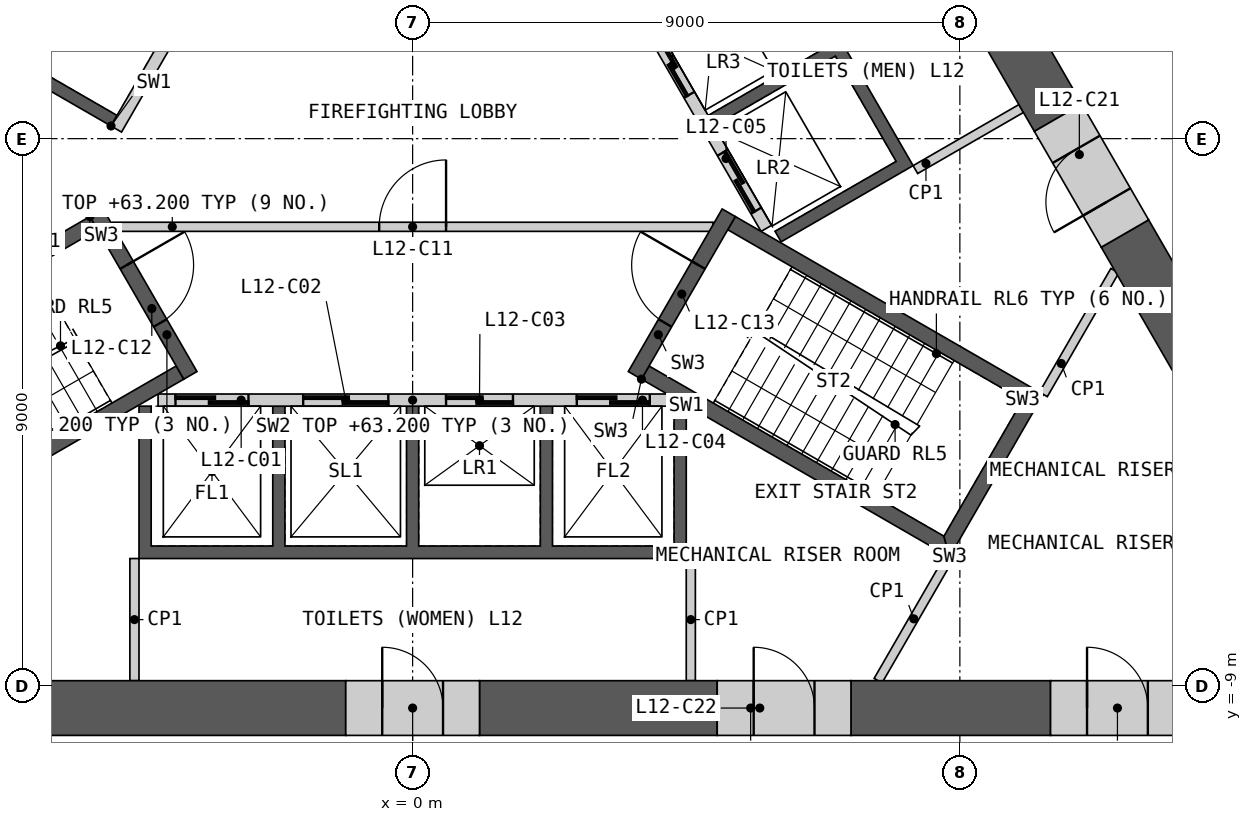
"""IFC4 building model, lengths in metres.
Left out: names, types, materials, properties, quantities, classifications, styles, units other than length and angle.
Written with IfcOpenShell. Run it as: python <this file> out.ifc"""

import sys

from ifc_helpers import new_model, si_unit, direction, frame, frame_2d, origin, place, context, subcontext, project, spatial, polyline, rectangle, outline, extrude, element, fill, save


model = new_model("IFC4")
c1 = context("Model", 3, precision=1e-05, world=origin(), true_north=direction((0.0, 1.0)))
c2 = subcontext(c1, "Body", "Model", "MODEL_VIEW")
j1 = project(units=[si_unit("LENGTHUNIT", "METRE"), si_unit("PLANEANGLEUNIT", "RADIAN")], contexts=[c1])
p1 = place(None, origin())
s1 = spatial("IfcSite", under=j1, at=p1, CompositionType="ELEMENT")
p2 = place(p1, origin())
s2 = spatial("IfcBuilding", under=s1, at=p2, CompositionType="ELEMENT")
p3 = place(p2, frame((0.0, 0.0, 59.4)))
s3 = spatial("IfcBuildingStorey", under=s2, at=p3, CompositionType="ELEMENT", Elevation=59.4)
p4 = place(p3, origin())
e1 = element("IfcWall", 1, at=p4, inside=s3, PredefinedType="SHEAR", context=c2, shape_type="SweptSolid", body=[
    extrude(outline(polyline([(4.5, -4.4), (4.5, -6.906), (-4.5, -6.906), (-4.5, -4.4), (-4.3, -4.4), (-4.3, -6.7), (-2.3, -6.7), (-2.3, -4.4), (-2.1, -4.4), (-2.1, -6.7), (-0.1, -6.7), (-0.1, -4.4), (0.1, -4.4), (0.1, -6.7), (2.1, -6.7), (2.1, -4.4), (2.3, -4.4), (2.3, -6.7), (4.3, -6.7), (4.3, -4.4), (4.5, -4.4)])), origin(), (0.0, 0.0, 1.0), 3.8),
])
p5 = place(p3, frame((-4.187, -4.3, 0.0), z_axis=(0.0, 0.0, 1.0), x_axis=(1.0, 0.0, 0.0)))
e2 = element("IfcWall", 2, at=p5, inside=s3, PredefinedType="SOLIDWALL", context=c2, shape_type="SweptSolid", body=[
    extrude(rectangle(XDim=8.373, YDim=0.2, at=frame_2d((4.187, 0.0))), origin(), (0.0, 0.0, 1.0), 3.8),
])
p6 = place(p5, frame((0.287, 0.0, 0.0)))
e3 = element("IfcOpeningElement", 3, at=p6, cuts=e2, PredefinedType="OPENING", context=c2, shape_type="SweptSolid", body=[
    extrude(rectangle(XDim=1.2, YDim=2.1, at=frame_2d((0.6, 1.05))), frame((0.0, 0.11, 0.0), z_axis=(0.0, -1.0, 0.0), x_axis=(1.0, 0.0, 0.0)), (0.0, 0.0, 1.0), 0.22),
])
p7 = place(p5, frame((2.387, 0.0, 0.0)))
e4 = element("IfcOpeningElement", 4, at=p7, cuts=e2, PredefinedType="OPENING", context=c2, shape_type="SweptSolid", body=[
    extrude(rectangle(XDim=1.4, YDim=2.1, at=frame_2d((0.7, 1.05))), frame((0.0, 0.11, 0.0), z_axis=(0.0, -1.0, 0.0), x_axis=(1.0, 0.0, 0.0)), (0.0, 0.0, 1.0), 0.22),
])
p8 = place(p5, frame((4.737, 0.0, 0.0)))
e5 = element("IfcOpeningElement", 5, at=p8, cuts=e2, PredefinedType="OPENING", context=c2, shape_type="SweptSolid", body=[
    extrude(rectangle(XDim=1.1, YDim=2.1, at=frame_2d((0.55, 1.05))), frame((0.0, 0.11, 0.0), z_axis=(0.0, -1.0, 0.0), x_axis=(1.0, 0.0, 0.0)), (0.0, 0.0, 1.0), 0.22),
])
p9 = place(p5, frame((6.887, 0.0, 0.0)))
e6 = element("IfcOpeningElement", 6, at=p9, cuts=e2, PredefinedType="OPENING", context=c2, shape_type="SweptSolid", body=[
    extrude(rectangle(XDim=1.2, YDim=2.1, at=frame_2d((0.6, 1.05))), frame((0.0, 0.11, 0.0), z_axis=(0.0, -1.0, 0.0), x_axis=(1.0, 0.0, 0.0)), (0.0, 0.0, 1.0), 0.22),
])
p10 = place(p3, origin())
e7 = element("IfcWall", 7, at=p10, inside=s3, PredefinedType="SHEAR", context=c2, shape_type="SweptSolid", body=[
    extrude(outline(polyline([(2.66, 4.192), (4.831, 5.445), (8.231, -0.444), (6.061, -1.697), (5.96, -1.524), (7.952, -0.374), (6.952, 1.358), (4.96, 0.208), (4.861, 0.381), (6.852, 1.531), (5.852, 3.263), (3.861, 2.113), (3.76, 2.287), (5.752, 3.437), (4.752, 5.169), (2.76, 4.019), (2.66, 4.192)])), origin(), (0.0, 0.0, 1.0), 3.8),
])
p11 = place(p3, frame((5.817, -1.476, 0.0), z_axis=(0.0, 0.0, 1.0), x_axis=(-0.500002616675, 0.866023893041, 0.0)))
e8 = element("IfcWall", 8, at=p11, inside=s3, PredefinedType="SOLIDWALL", context=c2, shape_type="SweptSolid", body=[
    extrude(rectangle(XDim=8.373, YDim=0.2, at=frame_2d((4.187, 0.0))), origin(), (0.0, 0.0, 1.0), 3.8),
])
p12 = place(p11, frame((0.337, 0.0, 0.0)))
e9 = element("IfcOpeningElement", 9, at=p12, cuts=e8, PredefinedType="OPENING", context=c2, shape_type="SweptSolid", body=[
    extrude(rectangle(XDim=1.1, YDim=2.1, at=frame_2d((0.55, 1.05))), frame((0.0, 0.11, 0.0), z_axis=(0.0, -1.0, 0.0), x_axis=(1.0, 0.0, 0.0)), (0.0, 0.0, 1.0), 0.22),
])
p13 = place(p11, frame((2.537, 0.0, 0.0)))
e10 = element("IfcOpeningElement", 10, at=p13, cuts=e8, PredefinedType="OPENING", context=c2, shape_type="SweptSolid", body=[
    extrude(rectangle(XDim=1.1, YDim=2.1, at=frame_2d((0.55, 1.05))), frame((0.0, 0.11, 0.0), z_axis=(0.0, -1.0, 0.0), x_axis=(1.0, 0.0, 0.0)), (0.0, 0.0, 1.0), 0.22),
])
p14 = place(p11, frame((4.737, 0.0, 0.0)))
e11 = element("IfcOpeningElement", 11, at=p14, cuts=e8, PredefinedType="OPENING", context=c2, shape_type="SweptSolid", body=[
    extrude(rectangle(XDim=1.1, YDim=2.1, at=frame_2d((0.55, 1.05))), frame((0.0, 0.11, 0.0), z_axis=(0.0, -1.0, 0.0), x_axis=(1.0, 0.0, 0.0)), (0.0, 0.0, 1.0), 0.22),
])
p15 = place(p11, frame((7.037, 0.0, 0.0)))
e12 = element("IfcOpeningElement", 12, at=p15, cuts=e8, PredefinedType="OPENING", context=c2, shape_type="SweptSolid", body=[
    extrude(rectangle(XDim=0.9, YDim=2.1, at=frame_2d((0.45, 1.05))), frame((0.0, 0.11, 0.0), z_axis=(0.0, -1.0, 0.0), x_axis=(1.0, 0.0, 0.0)), (0.0, 0.0, 1.0), 0.22),
])
p16 = place(p3, origin())
e13 = element("IfcWall", 13, at=p16, inside=s3, PredefinedType="SHEAR", context=c2, shape_type="SweptSolid", body=[
    extrude(outline(polyline([(-4.96, 0.208), (-7.131, 1.461), (-5.931, 3.54), (-3.76, 2.287), (-3.861, 2.113), (-5.852, 3.263), (-6.852, 1.531), (-4.861, 0.381), (-4.96, 0.208)])), origin(), (0.0, 0.0, 1.0), 3.8),
])
p17 = place(p3, frame((-1.631, 5.776, 0.0), z_axis=(0.0, 0.0, 1.0), x_axis=(-0.499992876559, -0.866029516466, 0.0)))
e14 = element("IfcWall", 14, at=p17, inside=s3, PredefinedType="SOLIDWALL", context=c2, shape_type="SweptSolid", body=[
    extrude(rectangle(XDim=6.486, YDim=0.2, at=frame_2d((3.243, 0.0))), origin(), (0.0, 0.0, 1.0), 3.8),
])
p18 = place(p17, frame((0.437, 0.0, 0.0)))
e15 = element("IfcOpeningElement", 15, at=p18, cuts=e14, PredefinedType="OPENING", context=c2, shape_type="SweptSolid", body=[
    extrude(rectangle(XDim=0.9, YDim=2.1, at=frame_2d((0.45, 1.05))), frame((0.0, 0.11, 0.0), z_axis=(0.0, -1.0, 0.0), x_axis=(1.0, 0.0, 0.0)), (0.0, 0.0, 1.0), 0.22),
])
p19 = place(p17, frame((2.637, 0.0, 0.0)))
e16 = element("IfcOpeningElement", 16, at=p19, cuts=e14, PredefinedType="OPENING", context=c2, shape_type="SweptSolid", body=[
    extrude(rectangle(XDim=0.9, YDim=2.1, at=frame_2d((0.45, 1.05))), frame((0.0, 0.11, 0.0), z_axis=(0.0, -1.0, 0.0), x_axis=(1.0, 0.0, 0.0)), (0.0, 0.0, 1.0), 0.22),
])
p20 = place(p3, frame((-4.941, -1.45, 0.0), z_axis=(0.0, 0.0, 1.0), x_axis=(1.0, 0.0, 0.0)))
e17 = element("IfcWall", 17, at=p20, inside=s3, PredefinedType="PARTITIONING", context=c2, shape_type="SweptSolid", body=[
    extrude(rectangle(XDim=9.882, YDim=0.15, at=frame_2d((4.941, 0.0))), origin(), (0.0, 0.0, 1.0), 3.8),
])
p21 = place(p20, frame((4.391, 0.0, 0.0)))
e18 = element("IfcOpeningElement", 18, at=p21, cuts=e17, PredefinedType="OPENING", context=c2, shape_type="SweptSolid", body=[
    extrude(rectangle(XDim=1.1, YDim=2.1, at=frame_2d((0.55, 1.05))), frame((0.0, 0.085, 0.0), z_axis=(0.0, -1.0, 0.0), x_axis=(1.0, 0.0, 0.0)), (0.0, 0.0, 1.0), 0.17),
])
p22 = place(p3, origin())
e19 = element("IfcWall", 19, at=p22, inside=s3, PredefinedType="SHEAR", context=c2, shape_type="SweptSolid", body=[
    extrude(outline(polyline([(-5.307, -1.281), (-10.374, -4.206), (-10.032, -4.298), (-5.182, -1.498), (-5.307, -1.281)])), origin(), (0.0, 0.0, 1.0), 3.8),
])
p23 = place(p3, origin())
e20 = element("IfcWall", 20, at=p23, inside=s3, PredefinedType="SHEAR", context=c2, shape_type="SweptSolid", body=[
    extrude(outline(polyline([(-8.738, -6.539), (-8.83, -6.881), (-3.763, -3.956), (-3.888, -3.739), (-8.738, -6.539)])), origin(), (0.0, 0.0, 1.0), 3.8),
])
p24 = place(p3, frame((-5.199, -1.219, 0.0), z_axis=(0.0, 0.0, 1.0), x_axis=(0.499982516597, -0.866035497597, 0.0)))
e21 = element("IfcWall", 21, at=p24, inside=s3, PredefinedType="SHEAR", context=c2, shape_type="SweptSolid", body=[
    extrude(rectangle(XDim=3.088, YDim=0.25, at=frame_2d((1.544, 0.0))), origin(), (0.0, 0.0, 1.0), 3.8),
])
p25 = place(p24, frame((0.994, 0.0, 0.0)))
e22 = element("IfcOpeningElement", 22, at=p25, cuts=e21, PredefinedType="OPENING", context=c2, shape_type="SweptSolid", body=[
    extrude(rectangle(XDim=1.1, YDim=2.1, at=frame_2d((0.55, 1.05))), frame((0.0, 0.135, 0.0), z_axis=(0.0, -1.0, 0.0), x_axis=(1.0, 0.0, 0.0)), (0.0, 0.0, 1.0), 0.27),
])
p26 = place(p3, origin())
e23 = element("IfcWall", 23, at=p26, inside=s3, PredefinedType="SHEAR", context=c2, shape_type="SweptSolid", body=[
    extrude(outline(polyline([(3.763, -3.956), (8.83, -6.881), (8.738, -6.539), (3.888, -3.739), (3.763, -3.956)])), origin(), (0.0, 0.0, 1.0), 3.8),
])
p27 = place(p3, origin())
e24 = element("IfcWall", 24, at=p27, inside=s3, PredefinedType="SHEAR", context=c2, shape_type="SweptSolid", body=[
    extrude(outline(polyline([(8.83, -6.881), (10.374, -4.206), (10.032, -4.298), (8.738, -6.539), (8.83, -6.881)])), origin(), (0.0, 0.0, 1.0), 3.8),
])
p28 = place(p3, origin())
e25 = element("IfcWall", 25, at=p28, inside=s3, PredefinedType="SHEAR", context=c2, shape_type="SweptSolid", body=[
    extrude(outline(polyline([(10.032, -4.298), (10.374, -4.206), (5.307, -1.281), (5.182, -1.498), (10.032, -4.298)])), origin(), (0.0, 0.0, 1.0), 3.8),
])
p29 = place(p3, frame((3.655, -3.893, 0.0), z_axis=(0.0, 0.0, 1.0), x_axis=(0.499982516597, 0.866035497597, 0.0)))
e26 = element("IfcWall", 26, at=p29, inside=s3, PredefinedType="SHEAR", context=c2, shape_type="SweptSolid", body=[
    extrude(rectangle(XDim=3.088, YDim=0.25, at=frame_2d((1.544, 0.0))), origin(), (0.0, 0.0, 1.0), 3.8),
])
p30 = place(p29, frame((0.994, 0.0, 0.0)))
e27 = element("IfcOpeningElement", 27, at=p30, cuts=e26, PredefinedType="OPENING", context=c2, shape_type="SweptSolid", body=[
    extrude(rectangle(XDim=1.1, YDim=2.1, at=frame_2d((0.55, 1.05))), frame((0.0, 0.135, 0.0), z_axis=(0.0, -1.0, 0.0), x_axis=(1.0, 0.0, 0.0)), (0.0, 0.0, 1.0), 0.27),
])
for number, where, z_axis, x_axis in (
    (28, (4.575, -6.906, 0.0), (0.0, 0.0, 1.0), (0.0, -1.0, 0.0)),
    (29, (-4.575, -6.906, 0.0), (0.0, 0.0, 1.0), (0.0, -1.0, 0.0)),
):
    element("IfcWall", number, at=place(p3, frame(where, z_axis=z_axis, x_axis=x_axis)), inside=s3, PredefinedType="PARTITIONING", context=c2, shape_type="SweptSolid", body=[
        extrude(rectangle(XDim=2.009, YDim=0.15, at=frame_2d((1.004, 0.0))), origin(), (0.0, 0.0, 1.0), 3.8),
    ])
p31 = place(p3, frame((8.268, -0.509, 0.0), z_axis=(0.0, 0.0, 1.0), x_axis=(0.866035824272, 0.499981950752, 0.0)))
e30 = element("IfcWall", 30, at=p31, inside=s3, PredefinedType="PARTITIONING", context=c2, shape_type="SweptSolid", body=[
    extrude(rectangle(XDim=2.009, YDim=0.15, at=frame_2d((1.004, 0.0))), origin(), (0.0, 0.0, 1.0), 3.8),
])
p32 = place(p3, frame((8.83, -6.881, 0.0), z_axis=(0.0, 0.0, 1.0), x_axis=(-0.500073279432, -0.865983091751, 0.0)))
e31 = element("IfcWall", 31, at=p32, inside=s3, PredefinedType="PARTITIONING", context=c2, shape_type="SweptSolid", body=[
    extrude(rectangle(XDim=2.349, YDim=0.15, at=frame_2d((1.175, 0.0))), origin(), (0.0, 0.0, 1.0), 3.8),
])
p33 = place(p3, frame((10.374, -4.206, 0.0), z_axis=(0.0, 0.0, 1.0), x_axis=(0.499995339376, 0.86602809458, 0.0)))
e32 = element("IfcWall", 32, at=p33, inside=s3, PredefinedType="PARTITIONING", context=c2, shape_type="SweptSolid", body=[
    extrude(rectangle(XDim=2.349, YDim=0.15, at=frame_2d((1.175, 0.0))), origin(), (0.0, 0.0, 1.0), 3.8),
])
p34 = place(p3, frame((-15.441, -9.365, 0.0), z_axis=(0.0, 0.0, 1.0), x_axis=(1.0, 0.0, 0.0)))
e33 = element("IfcWall", 33, at=p34, inside=s3, PredefinedType="SHEAR", context=c2, shape_type="SweptSolid", body=[
    extrude(rectangle(XDim=14.341, YDim=0.9, at=frame_2d((7.17, 0.0))), origin(), (0.0, 0.0, 1.0), 3.8),
])
p35 = place(p3, frame((1.1, -9.365, 0.0), z_axis=(0.0, 0.0, 1.0), x_axis=(1.0, 0.0, 0.0)))
e34 = element("IfcWall", 34, at=p35, inside=s3, PredefinedType="SHEAR", context=c2, shape_type="SweptSolid", body=[
    extrude(rectangle(XDim=3.909, YDim=0.9, at=frame_2d((1.955, 0.0))), origin(), (0.0, 0.0, 1.0), 3.8),
])
p36 = place(p3, frame((7.209, -9.365, 0.0), z_axis=(0.0, 0.0, 1.0), x_axis=(1.0, 0.0, 0.0)))
e35 = element("IfcWall", 35, at=p36, inside=s3, PredefinedType="SHEAR", context=c2, shape_type="SweptSolid", body=[
    extrude(rectangle(XDim=3.282, YDim=0.9, at=frame_2d((1.641, 0.0))), origin(), (0.0, 0.0, 1.0), 3.8),
])
p37 = place(p3, frame((15.831, -8.69, 0.0), z_axis=(0.0, 0.0, 1.0), x_axis=(-0.499995435471, 0.8660280391, 0.0)))
e36 = element("IfcWall", 36, at=p37, inside=s3, PredefinedType="SHEAR", context=c2, shape_type="SweptSolid", body=[
    extrude(rectangle(XDim=8.232, YDim=0.9, at=frame_2d((4.116, 0.0))), origin(), (0.0, 0.0, 1.0), 3.8),
])
p38 = place(p3, frame((10.615, 0.344, 0.0), z_axis=(0.0, 0.0, 1.0), x_axis=(-0.500044870432, 0.865999496279, 0.0)))
e37 = element("IfcWall", 37, at=p38, inside=s3, PredefinedType="SHEAR", context=c2, shape_type="SweptSolid", body=[
    extrude(rectangle(XDim=2.709, YDim=0.9, at=frame_2d((1.354, 0.0))), origin(), (0.0, 0.0, 1.0), 3.8),
])
p39 = place(p3, frame((-1.1, -9.365, 0.0), z_axis=(0.0, 0.0, 1.0), x_axis=(1.0, 0.0, 0.0)))
e38 = element("IfcWall", 38, at=p39, inside=s3, PredefinedType="SHEAR", context=c2, shape_type="SweptSolid", body=[
    extrude(rectangle(XDim=2.2, YDim=0.9, at=frame_2d((1.1, 0.0))), origin(), (0.0, 0.0, 1.0), 3.8),
])
p40 = place(p39, frame((0.6, 0.0, 0.0)))
e39 = element("IfcOpeningElement", 39, at=p40, cuts=e38, PredefinedType="OPENING", context=c2, shape_type="SweptSolid", body=[
    extrude(rectangle(XDim=1.0, YDim=2.1, at=frame_2d((0.5, 1.05))), frame((0.0, 0.46, 0.0), z_axis=(0.0, -1.0, 0.0), x_axis=(1.0, 0.0, 0.0)), (0.0, 0.0, 1.0), 0.92),
])
p41 = place(p3, frame((10.491, -9.365, 0.0), z_axis=(0.0, 0.0, 1.0), x_axis=(1.0, 0.0, 0.0)))
e40 = element("IfcWall", 40, at=p41, inside=s3, PredefinedType="SHEAR", context=c2, shape_type="SweptSolid", body=[
    extrude(rectangle(XDim=2.2, YDim=0.9, at=frame_2d((1.1, 0.0))), origin(), (0.0, 0.0, 1.0), 3.8),
])
p42 = place(p41, frame((0.6, 0.0, 0.0)))
e41 = element("IfcOpeningElement", 41, at=p42, cuts=e40, PredefinedType="OPENING", context=c2, shape_type="SweptSolid", body=[
    extrude(rectangle(XDim=1.0, YDim=2.1, at=frame_2d((0.5, 1.05))), frame((0.0, 0.46, 0.0), z_axis=(0.0, -1.0, 0.0), x_axis=(1.0, 0.0, 0.0)), (0.0, 0.0, 1.0), 0.92),
])
p43 = place(p3, frame((11.715, -1.561, 0.0), z_axis=(0.0, 0.0, 1.0), x_axis=(-0.499946605688, 0.86605622881, 0.0)))
e42 = element("IfcWall", 42, at=p43, inside=s3, PredefinedType="SHEAR", context=c2, shape_type="SweptSolid", body=[
    extrude(rectangle(XDim=2.2, YDim=0.9, at=frame_2d((1.1, 0.0))), origin(), (0.0, 0.0, 1.0), 3.8),
])
p44 = place(p43, frame((0.6, 0.0, 0.0)))
e43 = element("IfcOpeningElement", 43, at=p44, cuts=e42, PredefinedType="OPENING", context=c2, shape_type="SweptSolid", body=[
    extrude(rectangle(XDim=1.0, YDim=2.1, at=frame_2d((0.5, 1.05))), frame((0.0, 0.46, 0.0), z_axis=(0.0, -1.0, 0.0), x_axis=(1.0, 0.0, 0.0)), (0.0, 0.0, 1.0), 0.92),
])
p45 = place(p3, frame((5.009, -9.365, 0.0), z_axis=(0.0, 0.0, 1.0), x_axis=(1.0, 0.0, 0.0)))
e44 = element("IfcWall", 44, at=p45, inside=s3, PredefinedType="SHEAR", context=c2, shape_type="SweptSolid", body=[
    extrude(rectangle(XDim=2.2, YDim=0.9, at=frame_2d((1.1, 0.0))), origin(), (0.0, 0.0, 1.0), 3.8),
])
p46 = place(p45, frame((0.6, 0.0, 0.0)))
e45 = element("IfcOpeningElement", 45, at=p46, cuts=e44, PredefinedType="OPENING", context=c2, shape_type="SweptSolid", body=[
    extrude(rectangle(XDim=1.0, YDim=2.1, at=frame_2d((0.5, 1.05))), frame((0.0, 0.46, 0.0), z_axis=(0.0, -1.0, 0.0), x_axis=(1.0, 0.0, 0.0)), (0.0, 0.0, 1.0), 0.92),
])
p47 = place(p3, frame((10.719, 5.865, 0.0), z_axis=(0.0, 0.0, 1.0), x_axis=(0.49999175339, -0.866030164915, 0.0)))
e46 = element("IfcWall", 46, at=p47, inside=s3, PredefinedType="PARTITIONING", context=c2, shape_type="SweptSolid", body=[
    extrude(rectangle(XDim=10.019, YDim=0.2, at=frame_2d((5.009, 0.0))), origin(), (0.0, 0.0, 1.0), 3.8),
])
p48 = place(p47, frame((4.585, 0.0, 0.0)))
e47 = element("IfcOpeningElement", 47, at=p48, cuts=e46, PredefinedType="OPENING", context=c2, shape_type="SweptSolid", body=[
    extrude(rectangle(XDim=0.95, YDim=2.1, at=frame_2d((0.475, 1.05))), frame((0.0, 0.11, 0.0), z_axis=(0.0, -1.0, 0.0), x_axis=(1.0, 0.0, 0.0)), (0.0, 0.0, 1.0), 0.22),
])
p49 = place(p6, origin())
e48 = element("IfcDoor", 48, at=p49, inside=s3, OperationType="SLIDING_TO_LEFT", PredefinedType="DOOR", context=c2, shape_type="SweptSolid", body=[
    extrude(rectangle(XDim=1.2, YDim=2.1, at=frame_2d((0.6, 1.05))), frame((0.0, 0.025, 0.0), z_axis=(0.0, -1.0, 0.0), x_axis=(1.0, 0.0, 0.0)), (0.0, 0.0, 1.0), 0.05),
])
fill(e3, e48)
p50 = place(p7, origin())
e49 = element("IfcDoor", 49, at=p50, inside=s3, OperationType="SLIDING_TO_LEFT", PredefinedType="DOOR", context=c2, shape_type="SweptSolid", body=[
    extrude(rectangle(XDim=1.4, YDim=2.1, at=frame_2d((0.7, 1.05))), frame((0.0, 0.025, 0.0), z_axis=(0.0, -1.0, 0.0), x_axis=(1.0, 0.0, 0.0)), (0.0, 0.0, 1.0), 0.05),
])
fill(e4, e49)
p51 = place(p8, origin())
e50 = element("IfcDoor", 50, at=p51, inside=s3, OperationType="SLIDING_TO_LEFT", PredefinedType="DOOR", context=c2, shape_type="SweptSolid", body=[
    extrude(rectangle(XDim=1.1, YDim=2.1, at=frame_2d((0.55, 1.05))), frame((0.0, 0.025, 0.0), z_axis=(0.0, -1.0, 0.0), x_axis=(1.0, 0.0, 0.0)), (0.0, 0.0, 1.0), 0.05),
])
fill(e5, e50)
p52 = place(p9, origin())
e51 = element("IfcDoor", 51, at=p52, inside=s3, OperationType="SLIDING_TO_LEFT", PredefinedType="DOOR", context=c2, shape_type="SweptSolid", body=[
    extrude(rectangle(XDim=1.2, YDim=2.1, at=frame_2d((0.6, 1.05))), frame((0.0, 0.025, 0.0), z_axis=(0.0, -1.0, 0.0), x_axis=(1.0, 0.0, 0.0)), (0.0, 0.0, 1.0), 0.05),
])
fill(e6, e51)
p53 = place(p12, origin())
e52 = element("IfcDoor", 52, at=p53, inside=s3, OperationType="SLIDING_TO_LEFT", PredefinedType="DOOR", context=c2, shape_type="SweptSolid", body=[
    extrude(rectangle(XDim=1.1, YDim=2.1, at=frame_2d((0.55, 1.05))), frame((0.0, 0.025, 0.0), z_axis=(0.0, -1.0, 0.0), x_axis=(1.0, 0.0, 0.0)), (0.0, 0.0, 1.0), 0.05),
])
fill(e9, e52)
p54 = place(p13, origin())
e53 = element("IfcDoor", 53, at=p54, inside=s3, OperationType="SLIDING_TO_LEFT", PredefinedType="DOOR", context=c2, shape_type="SweptSolid", body=[
    extrude(rectangle(XDim=1.1, YDim=2.1, at=frame_2d((0.55, 1.05))), frame((0.0, 0.025, 0.0), z_axis=(0.0, -1.0, 0.0), x_axis=(1.0, 0.0, 0.0)), (0.0, 0.0, 1.0), 0.05),
])
fill(e10, e53)
p55 = place(p21, origin())
e54 = element("IfcDoor", 54, at=p55, inside=s3, OperationType="SINGLE_SWING_RIGHT", PredefinedType="DOOR", context=c2, shape_type="SweptSolid", body=[
    extrude(rectangle(XDim=1.1, YDim=2.1, at=frame_2d((0.55, 1.05))), frame((0.0, 0.025, 0.0), z_axis=(0.0, -1.0, 0.0), x_axis=(1.0, 0.0, 0.0)), (0.0, 0.0, 1.0), 0.05),
])
fill(e18, e54)
p56 = place(p25, origin())
e55 = element("IfcDoor", 55, at=p56, inside=s3, OperationType="SINGLE_SWING_LEFT", PredefinedType="DOOR", context=c2, shape_type="SweptSolid", body=[
    extrude(rectangle(XDim=1.1, YDim=2.1, at=frame_2d((0.55, 1.05))), frame((0.0, 0.025, 0.0), z_axis=(0.0, -1.0, 0.0), x_axis=(1.0, 0.0, 0.0)), (0.0, 0.0, 1.0), 0.05),
])
fill(e22, e55)
p57 = place(p30, origin())
e56 = element("IfcDoor", 56, at=p57, inside=s3, OperationType="SINGLE_SWING_RIGHT", PredefinedType="DOOR", context=c2, shape_type="SweptSolid", body=[
    extrude(rectangle(XDim=1.1, YDim=2.1, at=frame_2d((0.55, 1.05))), frame((0.0, 0.025, 0.0), z_axis=(0.0, -1.0, 0.0), x_axis=(1.0, 0.0, 0.0)), (0.0, 0.0, 1.0), 0.05),
])
fill(e27, e56)
p58 = place(p40, origin())
e57 = element("IfcDoor", 57, at=p58, inside=s3, OperationType="SINGLE_SWING_LEFT", PredefinedType="DOOR", context=c2, shape_type="SweptSolid", body=[
    extrude(rectangle(XDim=1.0, YDim=2.1, at=frame_2d((0.5, 1.05))), frame((0.0, 0.205, 0.0), z_axis=(0.0, -1.0, 0.0), x_axis=(1.0, 0.0, 0.0)), (0.0, 0.0, 1.0), 0.05),
])
fill(e39, e57)
p59 = place(p42, origin())
e58 = element("IfcDoor", 58, at=p59, inside=s3, OperationType="SINGLE_SWING_LEFT", PredefinedType="DOOR", context=c2, shape_type="SweptSolid", body=[
    extrude(rectangle(XDim=1.0, YDim=2.1, at=frame_2d((0.5, 1.05))), frame((0.0, 0.205, 0.0), z_axis=(0.0, -1.0, 0.0), x_axis=(1.0, 0.0, 0.0)), (0.0, 0.0, 1.0), 0.05),
])
fill(e41, e58)
p60 = place(p44, origin())
e59 = element("IfcDoor", 59, at=p60, inside=s3, OperationType="SINGLE_SWING_LEFT", PredefinedType="DOOR", context=c2, shape_type="SweptSolid", body=[
    extrude(rectangle(XDim=1.0, YDim=2.1, at=frame_2d((0.5, 1.05))), frame((0.0, 0.205, 0.0), z_axis=(0.0, -1.0, 0.0), x_axis=(1.0, 0.0, 0.0)), (0.0, 0.0, 1.0), 0.05),
])
fill(e43, e59)
p61 = place(p46, origin())
e60 = element("IfcDoor", 60, at=p61, inside=s3, OperationType="SINGLE_SWING_LEFT", PredefinedType="DOOR", context=c2, shape_type="SweptSolid", body=[
    extrude(rectangle(XDim=1.0, YDim=2.1, at=frame_2d((0.5, 1.05))), frame((0.0, 0.205, 0.0), z_axis=(0.0, -1.0, 0.0), x_axis=(1.0, 0.0, 0.0)), (0.0, 0.0, 1.0), 0.05),
])
fill(e45, e60)
save(model, sys.argv[1])
